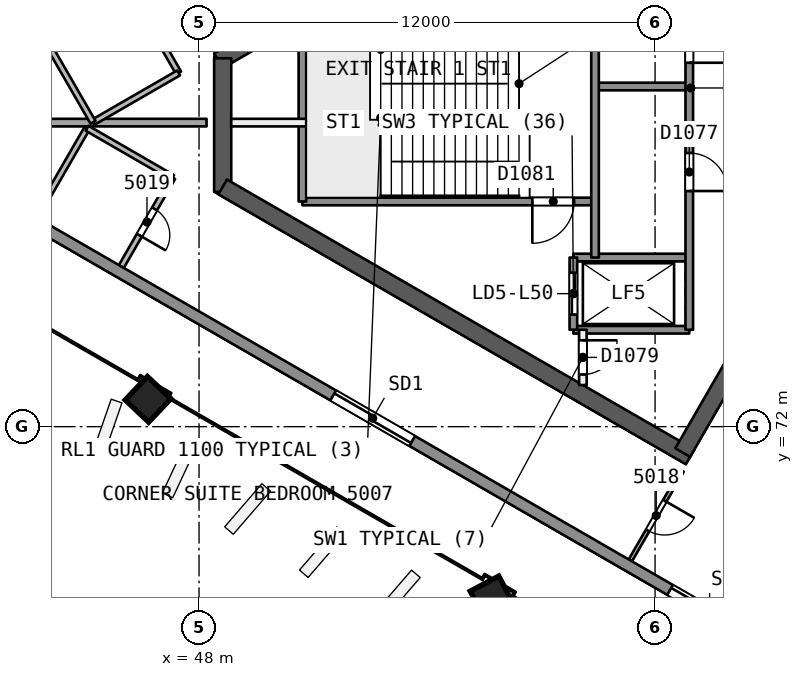
"""IFC4 building model, lengths in metres.
Left out: names, types, materials, properties, quantities, classifications, styles, units other than length and angle.
Written with IfcOpenShell. Run it as: python <this file> out.ifc"""

import sys

from ifc_helpers import new_model, si_unit, direction, frame, frame_2d, origin, origin_2d, place, context, subcontext, project, spatial, rectangle, extrude, element, fill, save


model = new_model("IFC4")
c1 = context("Model", 3, precision=1e-05, world=origin(), true_north=direction((0.0, 1.0)))
c2 = subcontext(c1, "Body", "Model", "MODEL_VIEW")
j1 = project(units=[si_unit("LENGTHUNIT", "METRE"), si_unit("PLANEANGLEUNIT", "RADIAN")], contexts=[c1])
p1 = place(None, origin())
s1 = spatial("IfcSite", under=j1, at=p1, CompositionType="ELEMENT")
p2 = place(p1, origin())
s2 = spatial("IfcBuilding", under=s1, at=p2, CompositionType="ELEMENT")
p3 = place(p2, frame((0.0, 0.0, 205.8)))
s3 = spatial("IfcBuildingStorey", under=s2, at=p3, CompositionType="ELEMENT", Elevation=205.8)
p4 = place(p3, frame((65.74, 80.0, 0.0), z_axis=(0.0, 0.0, 1.0), x_axis=(-0.499991857942, 0.866030104553, 0.0)))
e1 = element("IfcWall", 1, at=p4, inside=s3, PredefinedType="SHEAR", context=c2, shape_type="SweptSolid", body=[
    extrude(rectangle(XDim=10.25, YDim=0.45, at=frame_2d((5.125, 0.0))), origin(), (0.0, 0.0, 1.0), 3.7),
])
p5 = place(p4, frame((0.82, 0.0, 0.0)))
e2 = element("IfcOpeningElement", 2, at=p5, cuts=e1, PredefinedType="OPENING", context=c2, shape_type="SweptSolid", body=[
    extrude(rectangle(XDim=1.2, YDim=2.1, at=frame_2d((0.6, 1.05))), frame((0.0, 0.235, 0.0), z_axis=(0.0, -1.0, 0.0), x_axis=(1.0, 0.0, 0.0)), (0.0, 0.0, 1.0), 0.471),
])
p6 = place(p3, frame((60.728, 88.682, 0.0), z_axis=(0.0, 0.0, 1.0), x_axis=(-0.866021613849, -0.500006564303, 0.0)))
e3 = element("IfcWall", 3, at=p6, inside=s3, PredefinedType="SHEAR", context=c2, shape_type="SweptSolid", body=[
    extrude(rectangle(XDim=14.108, YDim=0.45, at=frame_2d((7.054, 0.0))), origin(), (0.0, 0.0, 1.0), 3.7),
])
p7 = place(p3, frame((48.622, 81.693, 0.0), z_axis=(0.0, 0.0, 1.0), x_axis=(0.0, -1.0, 0.0)))
e4 = element("IfcWall", 4, at=p7, inside=s3, PredefinedType="SHEAR", context=c2, shape_type="SweptSolid", body=[
    extrude(rectangle(XDim=3.515, YDim=0.45, at=frame_2d((1.758, 0.0))), origin(), (0.0, 0.0, 1.0), 3.7),
])
p8 = place(p3, frame((48.622, 78.307, 0.0), z_axis=(0.0, 0.0, 1.0), x_axis=(0.86602701116, -0.499997215934, 0.0)))
e5 = element("IfcWall", 5, at=p8, inside=s3, PredefinedType="SHEAR", context=c2, shape_type="SweptSolid", body=[
    extrude(rectangle(XDim=14.204, YDim=0.45, at=frame_2d((7.102, 0.0))), origin(), (0.0, 0.0, 1.0), 3.7),
])
p9 = place(p3, frame((60.728, 71.318, 0.0), z_axis=(0.0, 0.0, 1.0), x_axis=(0.500012416173, 0.866018235185, 0.0)))
e6 = element("IfcWall", 6, at=p9, inside=s3, PredefinedType="SHEAR", context=c2, shape_type="SweptSolid", body=[
    extrude(rectangle(XDim=10.155, YDim=0.45, at=frame_2d((5.078, 0.0))), origin(), (0.0, 0.0, 1.0), 3.7),
])
p10 = place(p9, frame((8.005, 0.0, 0.0)))
e7 = element("IfcOpeningElement", 7, at=p10, cuts=e6, PredefinedType="OPENING", context=c2, shape_type="SweptSolid", body=[
    extrude(rectangle(XDim=1.2, YDim=2.1, at=frame_2d((0.6, 1.05))), frame((0.0, 0.235, 0.0), z_axis=(0.0, -1.0, 0.0), x_axis=(1.0, 0.0, 0.0)), (0.0, 0.0, 1.0), 0.471),
])
p11 = place(p3, frame((46.623, 72.711, 0.0), z_axis=(0.028559101991, 0.006859460986, 0.999568569678), x_axis=(-0.866405921364, 0.498884527899, 0.021330898914)))
e8 = element("IfcColumn", 8, at=p11, inside=s3, PredefinedType="COLUMN", context=c2, shape_type="SweptSolid", body=[
    extrude(rectangle(XDim=0.85, YDim=0.85, at=origin_2d()), origin(), (0.0, 0.0, 1.0), 3.702),
])
p12 = place(p3, frame((55.687, 67.479, 0.0), z_axis=(0.019328516974, 0.012138044789, 0.999739504221), x_axis=(-0.865689041461, 0.500468616527, 0.010660551878)))
e9 = element("IfcColumn", 9, at=p12, inside=s3, PredefinedType="COLUMN", context=c2, shape_type="SweptSolid", body=[
    extrude(rectangle(XDim=0.85, YDim=0.85, at=origin_2d()), origin(), (0.0, 0.0, 1.0), 3.701),
])
p13 = place(p3, frame((46.012, 83.82, 0.0), z_axis=(0.0, 0.0, 1.0), x_axis=(0.499987231761, -0.866032775405, 0.0)))
e10 = element("IfcWall", 10, at=p13, inside=s3, PredefinedType="PARTITIONING", context=c2, shape_type="SweptSolid", body=[
    extrude(rectangle(XDim=2.9, YDim=0.15, at=frame_2d((1.45, 0.0))), origin(), (0.0, 0.0, 1.0), 3.3),
])
p14 = place(p13, frame((1.05, 0.0, 0.0)))
e11 = element("IfcOpeningElement", 11, at=p14, cuts=e10, PredefinedType="OPENING", context=c2, shape_type="SweptSolid", body=[
    extrude(rectangle(XDim=0.8, YDim=2.1, at=frame_2d((0.4, 1.05))), frame((0.0, 0.085, 0.0), z_axis=(0.0, -1.0, 0.0), x_axis=(1.0, 0.0, 0.0)), (0.0, 0.0, 1.0), 0.171),
])
p15 = place(p3, frame((47.462, 81.308, 0.0), z_axis=(0.0, 0.0, 1.0), x_axis=(-0.866021400173, -0.500006934395, 0.0)))
e12 = element("IfcWall", 12, at=p15, inside=s3, PredefinedType="PARTITIONING", context=c2, shape_type="SweptSolid", body=[
    extrude(rectangle(XDim=2.6, YDim=0.15, at=frame_2d((1.3, 0.0))), origin(), (0.0, 0.0, 1.0), 3.3),
])
p16 = place(p3, frame((45.211, 80.008, 0.0), z_axis=(0.0, 0.0, 1.0), x_axis=(-0.499993655377, 0.866029066823, 0.0)))
e13 = element("IfcWall", 13, at=p16, inside=s3, PredefinedType="PARTITIONING", context=c2, shape_type="SweptSolid", body=[
    extrude(rectangle(XDim=2.779, YDim=0.15, at=frame_2d((1.39, 0.0))), origin(), (0.0, 0.0, 1.0), 3.3),
])
p17 = place(p3, frame((43.821, 80.0, 0.0), z_axis=(0.0, 0.0, 1.0), x_axis=(1.0, 0.0, 0.0)))
e14 = element("IfcWall", 14, at=p17, inside=s3, PredefinedType="PARTITIONING", context=c2, shape_type="SweptSolid", body=[
    extrude(rectangle(XDim=4.377, YDim=0.2, at=frame_2d((2.188, 0.0))), origin(), (0.0, 0.0, 1.0), 3.3),
])
p18 = place(p3, frame((60.71, 70.838, 0.0), z_axis=(0.0, 0.0, 1.0), x_axis=(-0.499957886064, -0.866049716911, 0.0)))
e15 = element("IfcWall", 15, at=p18, inside=s3, PredefinedType="PARTITIONING", context=c2, shape_type="SweptSolid", body=[
    extrude(rectangle(XDim=2.723, YDim=0.1, at=frame_2d((1.361, 0.0))), origin(), (0.0, 0.0, 1.0), 3.3),
])
p19 = place(p18, frame((0.911, 0.0, 0.0)))
e16 = element("IfcOpeningElement", 16, at=p19, cuts=e15, PredefinedType="OPENING", context=c2, shape_type="SweptSolid", body=[
    extrude(rectangle(XDim=0.9, YDim=2.1, at=frame_2d((0.45, 1.05))), frame((0.0, 0.061, 0.0), z_axis=(0.0, -1.0, 0.0), x_axis=(1.0, 0.0, 0.0)), (0.0, 0.0, 1.0), 0.121),
])
p20 = place(p3, frame((43.821, 77.718, 0.0), z_axis=(0.0, 0.0, 1.0), x_axis=(0.49998543329, 0.866033813715, 0.0)))
e17 = element("IfcWall", 17, at=p20, inside=s3, PredefinedType="PARTITIONING", context=c2, shape_type="SweptSolid", body=[
    extrude(rectangle(XDim=2.464, YDim=0.15, at=frame_2d((1.232, 0.0))), origin(), (0.0, 0.0, 1.0), 3.3),
])
p21 = place(p3, frame((45.053, 79.852, 0.0), z_axis=(0.0, 0.0, 1.0), x_axis=(0.866021400173, -0.500006934395, 0.0)))
e18 = element("IfcWall", 18, at=p21, inside=s3, PredefinedType="PARTITIONING", context=c2, shape_type="SweptSolid", body=[
    extrude(rectangle(XDim=2.6, YDim=0.15, at=frame_2d((1.3, 0.0))), origin(), (0.0, 0.0, 1.0), 3.3),
])
p22 = place(p3, frame((47.305, 78.552, 0.0), z_axis=(0.0, 0.0, 1.0), x_axis=(-0.500077242023, -0.865980803489, 0.0)))
e19 = element("IfcWall", 19, at=p22, inside=s3, PredefinedType="PARTITIONING", context=c2, shape_type="SweptSolid", body=[
    extrude(rectangle(XDim=2.7, YDim=0.15, at=frame_2d((1.35, 0.0))), origin(), (0.0, 0.0, 1.0), 3.3),
])
p23 = place(p22, frame((0.95, 0.0, 0.0)))
e20 = element("IfcOpeningElement", 20, at=p23, cuts=e19, PredefinedType="OPENING", context=c2, shape_type="SweptSolid", body=[
    extrude(rectangle(XDim=0.8, YDim=2.1, at=frame_2d((0.4, 1.05))), frame((0.0, 0.085, 0.0), z_axis=(0.0, -1.0, 0.0), x_axis=(1.0, 0.0, 0.0)), (0.0, 0.0, 1.0), 0.171),
])
p24 = place(p3, frame((88.377, 51.549, 0.0), z_axis=(0.0, 0.0, 1.0), x_axis=(-0.866024917385, 0.500000842468, 0.0)))
e21 = element("IfcWall", 21, at=p24, inside=s3, PredefinedType="SOLIDWALL", context=c2, shape_type="SweptSolid", body=[
    extrude(rectangle(XDim=51.621, YDim=0.3, at=frame_2d((25.811, 0.0))), origin(), (0.0, 0.0, 1.0), 3.3),
])
p25 = place(p24, frame((29.911, 0.0, 0.0)))
e22 = element("IfcOpeningElement", 22, at=p25, cuts=e21, PredefinedType="OPENING", context=c2, shape_type="SweptSolid", body=[
    extrude(rectangle(XDim=2.4, YDim=2.4, at=frame_2d((1.2, 1.2))), frame((0.0, 0.161, 0.0), z_axis=(0.0, -1.0, 0.0), x_axis=(1.0, 0.0, 0.0)), (0.0, 0.0, 1.0), 0.321),
])
p26 = place(p24, frame((40.147, 0.0, 0.0)))
e23 = element("IfcOpeningElement", 23, at=p26, cuts=e21, PredefinedType="OPENING", context=c2, shape_type="SweptSolid", body=[
    extrude(rectangle(XDim=2.4, YDim=2.4, at=frame_2d((1.2, 1.2))), frame((0.0, 0.161, 0.0), z_axis=(0.0, -1.0, 0.0), x_axis=(1.0, 0.0, 0.0)), (0.0, 0.0, 1.0), 0.321),
])
p27 = place(p24, frame((19.934, 0.0, 0.0)))
e24 = element("IfcOpeningElement", 24, at=p27, cuts=e21, PredefinedType="OPENING", context=c2, shape_type="SweptSolid", body=[
    extrude(rectangle(XDim=2.4, YDim=2.4, at=frame_2d((1.2, 1.2))), frame((0.0, 0.161, 0.0), z_axis=(0.0, -1.0, 0.0), x_axis=(1.0, 0.0, 0.0)), (0.0, 0.0, 1.0), 0.321),
])
p28 = place(p24, frame((9.107, 0.0, 0.0)))
e25 = element("IfcOpeningElement", 25, at=p28, cuts=e21, PredefinedType="OPENING", context=c2, shape_type="SweptSolid", body=[
    extrude(rectangle(XDim=2.4, YDim=2.4, at=frame_2d((1.2, 1.2))), frame((0.0, 0.161, 0.0), z_axis=(0.0, -1.0, 0.0), x_axis=(1.0, 0.0, 0.0)), (0.0, 0.0, 1.0), 0.321),
])
p29 = place(p24, frame((25.534, 0.0, 0.9)))
e26 = element("IfcOpeningElement", 26, at=p29, cuts=e21, PredefinedType="OPENING", context=c2, shape_type="SweptSolid", body=[
    extrude(rectangle(XDim=1.8, YDim=1.5, at=frame_2d((0.9, 0.75))), frame((0.0, 0.161, 0.0), z_axis=(0.0, -1.0, 0.0), x_axis=(1.0, 0.0, 0.0)), (0.0, 0.0, 1.0), 0.321),
])
p30 = place(p3, frame((60.9, 80.95, 0.0), z_axis=(0.0, 0.0, 1.0), x_axis=(-1.0, 0.0, 0.0)))
e27 = element("IfcWall", 27, at=p30, inside=s3, PredefinedType="SOLIDWALL", context=c2, shape_type="SweptSolid", body=[
    extrude(rectangle(XDim=2.48, YDim=0.2, at=frame_2d((1.24, 0.0))), origin(), (0.0, 0.0, 1.0), 3.3),
])
p31 = place(p3, frame((50.82, 80.0, 0.0), z_axis=(0.0, 0.0, 1.0), x_axis=(-1.0, 0.0, 0.0)))
e28 = element("IfcWall", 28, at=p31, inside=s3, PredefinedType="PARTITIONING", context=c2, shape_type="SweptSolid", body=[
    extrude(rectangle(XDim=1.973, YDim=0.2, at=frame_2d((0.987, 0.0))), origin(), (0.0, 0.0, 1.0), 3.3),
])
p32 = place(p3, frame((58.42, 77.925, 0.0), z_axis=(0.0, 0.0, 1.0), x_axis=(-1.0, 0.0, 0.0)))
e29 = element("IfcWall", 29, at=p32, inside=s3, PredefinedType="SOLIDWALL", context=c2, shape_type="SweptSolid", body=[
    extrude(rectangle(XDim=7.7, YDim=0.2, at=frame_2d((3.85, 0.0))), origin(), (0.0, 0.0, 1.0), 3.3),
])
p33 = place(p32, frame((0.55, 0.0, 0.0)))
e30 = element("IfcOpeningElement", 30, at=p33, cuts=e29, PredefinedType="OPENING", context=c2, shape_type="SweptSolid", body=[
    extrude(rectangle(XDim=1.1, YDim=2.1, at=frame_2d((0.55, 1.05))), frame((0.0, 0.11, 0.0), z_axis=(0.0, -1.0, 0.0), x_axis=(1.0, 0.0, 0.0)), (0.0, 0.0, 1.0), 0.221),
])
for number, where, z_axis, x_axis in (
    (31, (60.9, 76.45, 0.0), (0.0, 0.0, 1.0), (-1.0, 0.0, 0.0)),
    (32, (60.9, 74.55, 0.0), (0.0, 0.0, 1.0), (-1.0, 0.0, 0.0)),
):
    element("IfcWall", number, at=place(p3, frame(where, z_axis=z_axis, x_axis=x_axis)), inside=s3, PredefinedType="SOLIDWALL", context=c2, shape_type="SweptSolid", body=[
        extrude(rectangle(XDim=3.05, YDim=0.2, at=frame_2d((1.525, 0.0))), origin(), (0.0, 0.0, 1.0), 3.3),
    ])
p34 = place(p3, frame((60.9, 85.45, 0.0), z_axis=(0.0, 0.0, 1.0), x_axis=(0.0, -1.0, 0.0)))
e33 = element("IfcWall", 33, at=p34, inside=s3, PredefinedType="SOLIDWALL", context=c2, shape_type="SweptSolid", body=[
    extrude(rectangle(XDim=10.9, YDim=0.2, at=frame_2d((5.45, 0.0))), origin(), (0.0, 0.0, 1.0), 3.3),
])
p35 = place(p34, frame((0.625, 0.0, 0.0)))
e34 = element("IfcOpeningElement", 34, at=p35, cuts=e33, PredefinedType="OPENING", context=c2, shape_type="SweptSolid", body=[
    extrude(rectangle(XDim=1.0, YDim=2.1, at=frame_2d((0.5, 1.05))), frame((0.0, 0.11, 0.0), z_axis=(0.0, -1.0, 0.0), x_axis=(1.0, 0.0, 0.0)), (0.0, 0.0, 1.0), 0.221),
])
p36 = place(p34, frame((2.875, 0.0, 0.0)))
e35 = element("IfcOpeningElement", 35, at=p36, cuts=e33, PredefinedType="OPENING", context=c2, shape_type="SweptSolid", body=[
    extrude(rectangle(XDim=1.0, YDim=2.1, at=frame_2d((0.5, 1.05))), frame((0.0, 0.11, 0.0), z_axis=(0.0, -1.0, 0.0), x_axis=(1.0, 0.0, 0.0)), (0.0, 0.0, 1.0), 0.221),
])
p37 = place(p34, frame((6.25, 0.0, 0.0)))
e36 = element("IfcOpeningElement", 36, at=p37, cuts=e33, PredefinedType="OPENING", context=c2, shape_type="SweptSolid", body=[
    extrude(rectangle(XDim=1.0, YDim=2.1, at=frame_2d((0.5, 1.05))), frame((0.0, 0.11, 0.0), z_axis=(0.0, -1.0, 0.0), x_axis=(1.0, 0.0, 0.0)), (0.0, 0.0, 1.0), 0.221),
])
p38 = place(p3, frame((58.42, 87.09, 0.0), z_axis=(0.0, 0.0, 1.0), x_axis=(0.0, -1.0, 0.0)))
e37 = element("IfcWall", 37, at=p38, inside=s3, PredefinedType="SOLIDWALL", context=c2, shape_type="SweptSolid", body=[
    extrude(rectangle(XDim=10.64, YDim=0.2, at=frame_2d((5.32, 0.0))), origin(), (0.0, 0.0, 1.0), 3.3),
])
p39 = place(p38, frame((0.37, 0.0, 0.0)))
e38 = element("IfcOpeningElement", 38, at=p39, cuts=e37, PredefinedType="OPENING", context=c2, shape_type="SweptSolid", body=[
    extrude(rectangle(XDim=0.9, YDim=2.1, at=frame_2d((0.45, 1.05))), frame((0.0, 0.11, 0.0), z_axis=(0.0, -1.0, 0.0), x_axis=(1.0, 0.0, 0.0)), (0.0, 0.0, 1.0), 0.221),
])
p40 = place(p3, frame((58.1, 74.55, 0.0), z_axis=(0.0, 0.0, 1.0), x_axis=(0.0, -1.0, 0.0)))
e39 = element("IfcWall", 39, at=p40, inside=s3, PredefinedType="PARTITIONING", context=c2, shape_type="SweptSolid", body=[
    extrude(rectangle(XDim=1.455, YDim=0.2, at=frame_2d((0.728, 0.0))), origin(), (0.0, 0.0, 1.0), 3.3),
])
p41 = place(p40, frame((0.278, 0.0, 0.0)))
e40 = element("IfcOpeningElement", 40, at=p41, cuts=e39, PredefinedType="OPENING", context=c2, shape_type="SweptSolid", body=[
    extrude(rectangle(XDim=0.9, YDim=2.1, at=frame_2d((0.45, 1.05))), frame((0.0, 0.11, 0.0), z_axis=(0.0, -1.0, 0.0), x_axis=(1.0, 0.0, 0.0)), (0.0, 0.0, 1.0), 0.221),
])
p42 = place(p3, frame((57.85, 76.45, 0.0), z_axis=(0.0, 0.0, 1.0), x_axis=(0.0, -1.0, 0.0)))
e41 = element("IfcWall", 41, at=p42, inside=s3, PredefinedType="SOLIDWALL", context=c2, shape_type="SweptSolid", body=[
    extrude(rectangle(XDim=1.9, YDim=0.2, at=frame_2d((0.95, 0.0))), origin(), (0.0, 0.0, 1.0), 3.3),
])
p43 = place(p42, frame((0.4, 0.0, 0.0)))
e42 = element("IfcOpeningElement", 42, at=p43, cuts=e41, PredefinedType="OPENING", context=c2, shape_type="SweptSolid", body=[
    extrude(rectangle(XDim=1.1, YDim=2.1, at=frame_2d((0.55, 1.05))), frame((0.0, 0.11, 0.0), z_axis=(0.0, -1.0, 0.0), x_axis=(1.0, 0.0, 0.0)), (0.0, 0.0, 1.0), 0.221),
])
p44 = place(p3, frame((50.72, 82.075, 0.0), z_axis=(0.0, 0.0, 1.0), x_axis=(0.0, -1.0, 0.0)))
e43 = element("IfcWall", 43, at=p44, inside=s3, PredefinedType="SOLIDWALL", context=c2, shape_type="SweptSolid", body=[
    extrude(rectangle(XDim=4.15, YDim=0.2, at=frame_2d((2.075, 0.0))), origin(), (0.0, 0.0, 1.0), 3.3),
])
p45 = place(p19, origin())
e44 = element("IfcDoor", 44, at=p45, inside=s3, OperationType="SINGLE_SWING_LEFT", PredefinedType="NOTDEFINED", context=c2, shape_type="SweptSolid", body=[
    extrude(rectangle(XDim=0.9, YDim=2.1, at=frame_2d((0.45, 1.05))), frame((0.0, 0.025, 0.0), z_axis=(0.0, -1.0, 0.0), x_axis=(1.0, 0.0, 0.0)), (0.0, 0.0, 1.0), 0.05),
])
fill(e16, e44)
p46 = place(p23, origin())
e45 = element("IfcDoor", 45, at=p46, inside=s3, OperationType="SINGLE_SWING_RIGHT", PredefinedType="NOTDEFINED", context=c2, shape_type="SweptSolid", body=[
    extrude(rectangle(XDim=0.8, YDim=2.1, at=frame_2d((0.4, 1.05))), frame((0.0, 0.025, 0.0), z_axis=(0.0, -1.0, 0.0), x_axis=(1.0, 0.0, 0.0)), (0.0, 0.0, 1.0), 0.05),
])
fill(e20, e45)
p47 = place(p25, origin())
e46 = element("IfcDoor", 46, at=p47, inside=s3, OperationType="SLIDING_TO_LEFT", PredefinedType="NOTDEFINED", context=c2, shape_type="SweptSolid", body=[
    extrude(rectangle(XDim=2.4, YDim=2.4, at=frame_2d((1.2, 1.2))), frame((0.0, 0.025, 0.0), z_axis=(0.0, -1.0, 0.0), x_axis=(1.0, 0.0, 0.0)), (0.0, 0.0, 1.0), 0.05),
])
fill(e22, e46)
p48 = place(p26, origin())
e47 = element("IfcDoor", 47, at=p48, inside=s3, OperationType="SLIDING_TO_RIGHT", PredefinedType="NOTDEFINED", context=c2, shape_type="SweptSolid", body=[
    extrude(rectangle(XDim=2.4, YDim=2.4, at=frame_2d((1.2, 1.2))), frame((0.0, 0.025, 0.0), z_axis=(0.0, -1.0, 0.0), x_axis=(1.0, 0.0, 0.0)), (0.0, 0.0, 1.0), 0.05),
])
fill(e23, e47)
p49 = place(p43, origin())
e48 = element("IfcDoor", 48, at=p49, inside=s3, OperationType="SLIDING_TO_RIGHT", PredefinedType="NOTDEFINED", context=c2, shape_type="SweptSolid", body=[
    extrude(rectangle(XDim=1.1, YDim=2.1, at=frame_2d((0.55, 1.05))), frame((0.0, 0.025, 0.0), z_axis=(0.0, -1.0, 0.0), x_axis=(1.0, 0.0, 0.0)), (0.0, 0.0, 1.0), 0.05),
])
fill(e42, e48)
p50 = place(p36, origin())
e49 = element("IfcDoor", 49, at=p50, inside=s3, OperationType="SINGLE_SWING_RIGHT", PredefinedType="NOTDEFINED", context=c2, shape_type="SweptSolid", body=[
    extrude(rectangle(XDim=1.0, YDim=2.1, at=frame_2d((0.5, 1.05))), frame((0.0, 0.025, 0.0), z_axis=(0.0, -1.0, 0.0), x_axis=(1.0, 0.0, 0.0)), (0.0, 0.0, 1.0), 0.05),
])
fill(e35, e49)
p51 = place(p37, origin())
e50 = element("IfcDoor", 50, at=p51, inside=s3, OperationType="SINGLE_SWING_RIGHT", PredefinedType="NOTDEFINED", context=c2, shape_type="SweptSolid", body=[
    extrude(rectangle(XDim=1.0, YDim=2.1, at=frame_2d((0.5, 1.05))), frame((0.0, 0.025, 0.0), z_axis=(0.0, -1.0, 0.0), x_axis=(1.0, 0.0, 0.0)), (0.0, 0.0, 1.0), 0.05),
])
fill(e36, e50)
p52 = place(p41, origin())
e51 = element("IfcDoor", 51, at=p52, inside=s3, OperationType="SINGLE_SWING_LEFT", PredefinedType="NOTDEFINED", context=c2, shape_type="SweptSolid", body=[
    extrude(rectangle(XDim=0.9, YDim=2.1, at=frame_2d((0.45, 1.05))), frame((0.0, 0.025, 0.0), z_axis=(0.0, -1.0, 0.0), x_axis=(1.0, 0.0, 0.0)), (0.0, 0.0, 1.0), 0.05),
])
fill(e40, e51)
p53 = place(p33, origin())
e52 = element("IfcDoor", 52, at=p53, inside=s3, OperationType="SINGLE_SWING_RIGHT", PredefinedType="NOTDEFINED", context=c2, shape_type="SweptSolid", body=[
    extrude(rectangle(XDim=1.1, YDim=2.1, at=frame_2d((0.55, 1.05))), frame((0.0, 0.025, 0.0), z_axis=(0.0, -1.0, 0.0), x_axis=(1.0, 0.0, 0.0)), (0.0, 0.0, 1.0), 0.05),
])
fill(e30, e52)
save(model, sys.argv[1])
